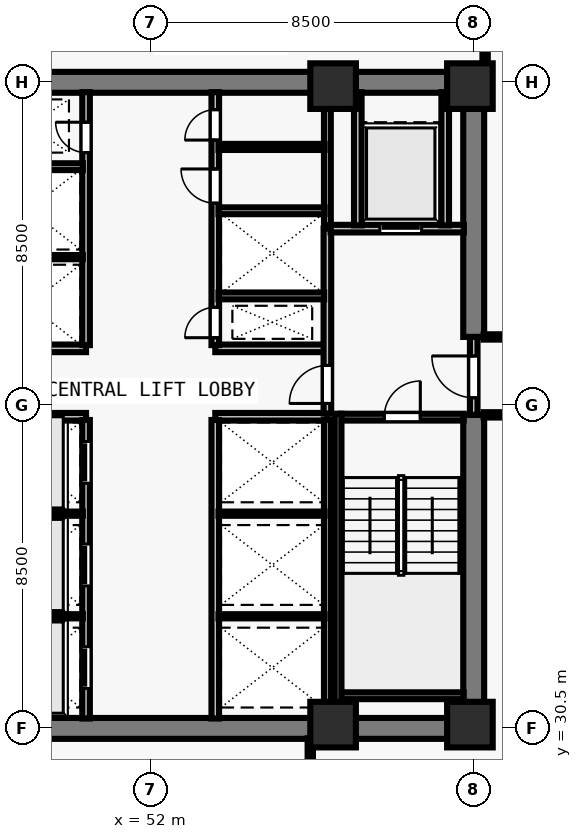
"""IFC4 building model, lengths in metres.
Left out: names, types, materials, properties, quantities, classifications, styles, units other than length and angle.
Written with IfcOpenShell. Run it as: python <this file> out.ifc"""

import sys

from ifc_helpers import new_model, si_unit, direction, frame, frame_2d, origin, origin_2d, place, context, subcontext, project, spatial, rectangle, extrude, element, fill, save


model = new_model("IFC4")
c1 = context("Model", 3, precision=1e-05, world=origin(), true_north=direction((0.0, 1.0)))
c2 = subcontext(c1, "Body", "Model", "MODEL_VIEW")
j1 = project(units=[si_unit("LENGTHUNIT", "METRE"), si_unit("PLANEANGLEUNIT", "RADIAN")], contexts=[c1])
p1 = place(None, origin())
s1 = spatial("IfcSite", under=j1, at=p1, CompositionType="ELEMENT")
p2 = place(p1, origin())
s2 = spatial("IfcBuilding", under=s1, at=p2, CompositionType="ELEMENT")
p3 = place(p2, frame((0.0, 0.0, 44.5)))
s3 = spatial("IfcBuildingStorey", under=s2, at=p3, CompositionType="ELEMENT", Elevation=44.5)
for number, where, z_axis, x_axis in (
    (1, (56.8, 30.6, 0.0), (0.0, 0.0, 1.0), (1.0, 0.0, 0.0)),
    (2, (60.4, 30.6, 0.0), (0.0, 0.0, 1.0), (1.0, 0.0, 0.0)),
    (3, (56.8, 47.4, 0.0), (0.0, 0.0, 1.0), (1.0, 0.0, 0.0)),
    (4, (60.4, 47.4, 0.0), (0.0, 0.0, 1.0), (1.0, 0.0, 0.0)),
):
    element("IfcColumn", number, at=place(p3, frame(where, z_axis=z_axis, x_axis=x_axis)), inside=s3, PredefinedType="COLUMN", context=c2, shape_type="SweptSolid", body=[
        extrude(rectangle(XDim=1.2, YDim=1.2, at=origin_2d()), origin(), (0.0, 0.0, 1.0), 3.5),
    ])
for number, where, z_axis, x_axis in (
    (5, (43.225, 30.5, 0.0), (0.0, 0.0, 1.0), (1.0, 0.0, 0.0)),
    (6, (43.225, 47.5, 0.0), (0.0, 0.0, 1.0), (1.0, 0.0, 0.0)),
):
    element("IfcWall", number, at=place(p3, frame(where, z_axis=z_axis, x_axis=x_axis)), inside=s3, PredefinedType="SHEAR", context=c2, shape_type="SweptSolid", body=[
        extrude(rectangle(XDim=17.55, YDim=0.55, at=frame_2d((8.775, 0.0))), origin(), (0.0, 0.0, 1.0), 3.28),
    ])
p4 = place(p3, frame((60.5, 30.765, 0.0), z_axis=(0.0, 0.0, 1.0), x_axis=(0.0, 1.0, 0.0)))
e7 = element("IfcWall", 7, at=p4, inside=s3, PredefinedType="SHEAR", context=c2, shape_type="SweptSolid", body=[
    extrude(rectangle(XDim=7.985, YDim=0.55, at=frame_2d((3.993, 0.0))), origin(), (0.0, 0.0, 1.0), 3.28),
])
p5 = place(p3, frame((60.5, 40.8, 0.0), z_axis=(0.0, 0.0, 1.0), x_axis=(0.0, 1.0, 0.0)))
e8 = element("IfcWall", 8, at=p5, inside=s3, PredefinedType="SHEAR", context=c2, shape_type="SweptSolid", body=[
    extrude(rectangle(XDim=6.435, YDim=0.55, at=frame_2d((3.218, 0.0))), origin(), (0.0, 0.0, 1.0), 3.28),
])
for number, where, z_axis, x_axis in (
    (9, (47.35, 38.7, 0.0), (0.0, 0.0, 1.0), (1.0, 0.0, 0.0)),
    (10, (47.35, 40.5, 0.0), (0.0, 0.0, 1.0), (1.0, 0.0, 0.0)),
    (11, (53.7, 38.7, 0.0), (0.0, 0.0, 1.0), (1.0, 0.0, 0.0)),
    (12, (53.7, 40.5, 0.0), (0.0, 0.0, 1.0), (1.0, 0.0, 0.0)),
):
    element("IfcWall", number, at=place(p3, frame(where, z_axis=z_axis, x_axis=x_axis)), inside=s3, PredefinedType="SOLIDWALL", context=c2, shape_type="SweptSolid", body=[
        extrude(rectangle(XDim=2.95, YDim=0.2, at=frame_2d((1.475, 0.0))), origin(), (0.0, 0.0, 1.0), 3.28),
    ])
p6 = place(p3, frame((50.3, 30.76, 0.0), z_axis=(0.0, 0.0, 1.0), x_axis=(0.0, 1.0, 0.0)))
e13 = element("IfcWall", 13, at=p6, inside=s3, PredefinedType="SOLIDWALL", context=c2, shape_type="SweptSolid", body=[
    extrude(rectangle(XDim=7.855, YDim=0.2, at=frame_2d((3.927, 0.0))), origin(), (0.0, 0.0, 1.0), 3.28),
])
p7 = place(p6, frame((0.79, 0.0, 0.0)))
e14 = element("IfcOpeningElement", 14, at=p7, cuts=e13, PredefinedType="OPENING", context=c2, shape_type="SweptSolid", body=[
    extrude(rectangle(XDim=1.1, YDim=2.2, at=frame_2d((0.55, 1.1))), frame((0.0, 0.11, 0.0), z_axis=(0.0, -1.0, 0.0), x_axis=(1.0, 0.0, 0.0)), (0.0, 0.0, 1.0), 0.22),
])
p8 = place(p6, frame((3.49, 0.0, 0.0)))
e15 = element("IfcOpeningElement", 15, at=p8, cuts=e13, PredefinedType="OPENING", context=c2, shape_type="SweptSolid", body=[
    extrude(rectangle(XDim=1.1, YDim=2.2, at=frame_2d((0.55, 1.1))), frame((0.0, 0.11, 0.0), z_axis=(0.0, -1.0, 0.0), x_axis=(1.0, 0.0, 0.0)), (0.0, 0.0, 1.0), 0.22),
])
p9 = place(p6, frame((6.19, 0.0, 0.0)))
e16 = element("IfcOpeningElement", 16, at=p9, cuts=e13, PredefinedType="OPENING", context=c2, shape_type="SweptSolid", body=[
    extrude(rectangle(XDim=1.1, YDim=2.2, at=frame_2d((0.55, 1.1))), frame((0.0, 0.11, 0.0), z_axis=(0.0, -1.0, 0.0), x_axis=(1.0, 0.0, 0.0)), (0.0, 0.0, 1.0), 0.22),
])
p10 = place(p3, frame((53.7, 30.76, 0.0), z_axis=(0.0, 0.0, 1.0), x_axis=(0.0, 1.0, 0.0)))
e17 = element("IfcWall", 17, at=p10, inside=s3, PredefinedType="SOLIDWALL", context=c2, shape_type="SweptSolid", body=[
    extrude(rectangle(XDim=7.855, YDim=0.2, at=frame_2d((3.927, 0.0))), origin(), (0.0, 0.0, 1.0), 3.28),
])
p11 = place(p3, frame((50.3, 40.585, 0.0), z_axis=(0.0, 0.0, 1.0), x_axis=(0.0, 1.0, 0.0)))
e18 = element("IfcWall", 18, at=p11, inside=s3, PredefinedType="SOLIDWALL", context=c2, shape_type="SweptSolid", body=[
    extrude(rectangle(XDim=6.655, YDim=0.2, at=frame_2d((3.328, 0.0))), origin(), (0.0, 0.0, 1.0), 3.28),
])
p12 = place(p11, frame((5.065, 0.0, 0.0)))
e19 = element("IfcOpeningElement", 19, at=p12, cuts=e18, PredefinedType="OPENING", context=c2, shape_type="SweptSolid", body=[
    extrude(rectangle(XDim=0.8, YDim=2.08, at=frame_2d((0.4, 1.04))), frame((0.0, 0.11, 0.0), z_axis=(0.0, -1.0, 0.0), x_axis=(1.0, 0.0, 0.0)), (0.0, 0.0, 1.0), 0.22),
])
p13 = place(p3, frame((53.7, 40.585, 0.0), z_axis=(0.0, 0.0, 1.0), x_axis=(0.0, 1.0, 0.0)))
e20 = element("IfcWall", 20, at=p13, inside=s3, PredefinedType="SOLIDWALL", context=c2, shape_type="SweptSolid", body=[
    extrude(rectangle(XDim=6.655, YDim=0.2, at=frame_2d((3.328, 0.0))), origin(), (0.0, 0.0, 1.0), 3.28),
])
p14 = place(p13, frame((0.195, 0.0, 0.0)))
e21 = element("IfcOpeningElement", 21, at=p14, cuts=e20, PredefinedType="OPENING", context=c2, shape_type="SweptSolid", body=[
    extrude(rectangle(XDim=0.8, YDim=2.08, at=frame_2d((0.4, 1.04))), frame((0.0, 0.11, 0.0), z_axis=(0.0, -1.0, 0.0), x_axis=(1.0, 0.0, 0.0)), (0.0, 0.0, 1.0), 0.22),
])
p15 = place(p13, frame((3.735, 0.0, 0.0)))
e22 = element("IfcOpeningElement", 22, at=p15, cuts=e20, PredefinedType="OPENING", context=c2, shape_type="SweptSolid", body=[
    extrude(rectangle(XDim=0.9, YDim=2.12, at=frame_2d((0.45, 1.06))), frame((0.0, 0.11, 0.0), z_axis=(0.0, -1.0, 0.0), x_axis=(1.0, 0.0, 0.0)), (0.0, 0.0, 1.0), 0.22),
])
p16 = place(p13, frame((5.395, 0.0, 0.0)))
e23 = element("IfcOpeningElement", 23, at=p16, cuts=e20, PredefinedType="OPENING", context=c2, shape_type="SweptSolid", body=[
    extrude(rectangle(XDim=0.8, YDim=2.1, at=frame_2d((0.4, 1.05))), frame((0.0, 0.11, 0.0), z_axis=(0.0, -1.0, 0.0), x_axis=(1.0, 0.0, 0.0)), (0.0, 0.0, 1.0), 0.22),
])
p17 = place(p3, frame((60.5, 38.75, 0.0), z_axis=(0.0, 0.0, 1.0), x_axis=(0.0, 1.0, 0.0)))
e24 = element("IfcWall", 24, at=p17, inside=s3, PredefinedType="SOLIDWALL", context=c2, shape_type="SweptSolid", body=[
    extrude(rectangle(XDim=2.05, YDim=0.2, at=frame_2d((1.025, 0.0))), origin(), (0.0, 0.0, 1.0), 3.28),
])
p18 = place(p17, frame((0.45, 0.0, 0.0)))
e25 = element("IfcOpeningElement", 25, at=p18, cuts=e24, PredefinedType="OPENING", context=c2, shape_type="SweptSolid", body=[
    extrude(rectangle(XDim=1.1, YDim=2.15, at=frame_2d((0.55, 1.075))), frame((0.0, 0.11, 0.0), z_axis=(0.0, -1.0, 0.0), x_axis=(1.0, 0.0, 0.0)), (0.0, 0.0, 1.0), 0.22),
])
p19 = place(p3, frame((56.65, 38.785, 0.0), z_axis=(0.0, 0.0, 1.0), x_axis=(0.0, 1.0, 0.0)))
e26 = element("IfcWall", 26, at=p19, inside=s3, PredefinedType="SOLIDWALL", context=c2, shape_type="SweptSolid", body=[
    extrude(rectangle(XDim=4.865, YDim=0.2, at=frame_2d((2.433, 0.0))), origin(), (0.0, 0.0, 1.0), 3.28),
])
p20 = place(p19, frame((0.265, 0.0, 0.0)))
e27 = element("IfcOpeningElement", 27, at=p20, cuts=e26, PredefinedType="OPENING", context=c2, shape_type="SweptSolid", body=[
    extrude(rectangle(XDim=1.0, YDim=2.15, at=frame_2d((0.5, 1.075))), frame((0.0, 0.11, 0.0), z_axis=(0.0, -1.0, 0.0), x_axis=(1.0, 0.0, 0.0)), (0.0, 0.0, 1.0), 0.22),
])
p21 = place(p3, frame((56.735, 43.65, 0.0), z_axis=(0.0, 0.0, 1.0), x_axis=(1.0, 0.0, 0.0)))
e28 = element("IfcWall", 28, at=p21, inside=s3, PredefinedType="SOLIDWALL", context=c2, shape_type="SweptSolid", body=[
    extrude(rectangle(XDim=3.505, YDim=0.2, at=frame_2d((1.752, 0.0))), origin(), (0.0, 0.0, 1.0), 3.28),
])
p22 = place(p21, frame((1.295, 0.0, 0.0)))
e29 = element("IfcOpeningElement", 29, at=p22, cuts=e28, PredefinedType="OPENING", context=c2, shape_type="SweptSolid", body=[
    extrude(rectangle(XDim=1.1, YDim=2.2, at=frame_2d((0.55, 1.1))), frame((0.0, 0.11, 0.0), z_axis=(0.0, -1.0, 0.0), x_axis=(1.0, 0.0, 0.0)), (0.0, 0.0, 1.0), 0.22),
])
for number, where, z_axis, x_axis in (
    (30, (57.45, 43.735, 0.0), (0.0, 0.0, 1.0), (0.0, 1.0, 0.0)),
    (31, (59.75, 43.735, 0.0), (0.0, 0.0, 1.0), (0.0, 1.0, 0.0)),
):
    element("IfcWall", number, at=place(p3, frame(where, z_axis=z_axis, x_axis=x_axis)), inside=s3, PredefinedType="SOLIDWALL", context=c2, shape_type="SweptSolid", body=[
        extrude(rectangle(XDim=3.505, YDim=0.2, at=frame_2d((1.752, 0.0))), origin(), (0.0, 0.0, 1.0), 3.28),
    ])
for number, where, z_axis, x_axis in (
    (32, (47.425, 33.45, 0.0), (0.0, 0.0, 1.0), (1.0, 0.0, 0.0)),
    (33, (47.425, 36.15, 0.0), (0.0, 0.0, 1.0), (1.0, 0.0, 0.0)),
):
    element("IfcWall", number, at=place(p3, frame(where, z_axis=z_axis, x_axis=x_axis)), inside=s3, PredefinedType="PARTITIONING", context=c2, shape_type="SweptSolid", body=[
        extrude(rectangle(XDim=2.79, YDim=0.11, at=frame_2d((1.395, 0.0))), origin(), (0.0, 0.0, 1.0), 3.28),
    ])
p23 = place(p3, frame((56.65, 30.76, 0.0), z_axis=(0.0, 0.0, 1.0), x_axis=(0.0, 1.0, 0.0)))
e34 = element("IfcWall", 34, at=p23, inside=s3, PredefinedType="SOLIDWALL", context=c2, shape_type="SweptSolid", body=[
    extrude(rectangle(XDim=7.855, YDim=0.18, at=frame_2d((3.927, 0.0))), origin(), (0.0, 0.0, 1.0), 3.28),
])
for number, where, z_axis, x_axis in (
    (35, (53.785, 33.45, 0.0), (0.0, 0.0, 1.0), (1.0, 0.0, 0.0)),
    (36, (53.785, 36.15, 0.0), (0.0, 0.0, 1.0), (1.0, 0.0, 0.0)),
):
    element("IfcWall", number, at=place(p3, frame(where, z_axis=z_axis, x_axis=x_axis)), inside=s3, PredefinedType="PARTITIONING", context=c2, shape_type="SweptSolid", body=[
        extrude(rectangle(XDim=2.79, YDim=0.11, at=frame_2d((1.395, 0.0))), origin(), (0.0, 0.0, 1.0), 3.28),
    ])
p24 = place(p3, frame((47.435, 42.9, 0.0), z_axis=(0.0, 0.0, 1.0), x_axis=(1.0, 0.0, 0.0)))
e37 = element("IfcWall", 37, at=p24, inside=s3, PredefinedType="PARTITIONING", context=c2, shape_type="SweptSolid", body=[
    extrude(rectangle(XDim=2.78, YDim=0.11, at=frame_2d((1.39, 0.0))), origin(), (0.0, 0.0, 1.0), 3.28),
])
p25 = place(p3, frame((47.425, 45.28, 0.0), z_axis=(0.0, 0.0, 1.0), x_axis=(1.0, 0.0, 0.0)))
e38 = element("IfcWall", 38, at=p25, inside=s3, PredefinedType="SOLIDWALL", context=c2, shape_type="SweptSolid", body=[
    extrude(rectangle(XDim=2.79, YDim=0.18, at=frame_2d((1.395, 0.0))), origin(), (0.0, 0.0, 1.0), 3.28),
])
p26 = place(p3, frame((56.65, 43.735, 0.0), z_axis=(0.0, 0.0, 1.0), x_axis=(0.0, 1.0, 0.0)))
e39 = element("IfcWall", 39, at=p26, inside=s3, PredefinedType="SOLIDWALL", context=c2, shape_type="SweptSolid", body=[
    extrude(rectangle(XDim=3.505, YDim=0.18, at=frame_2d((1.752, 0.0))), origin(), (0.0, 0.0, 1.0), 3.28),
])
p27 = place(p3, frame((53.785, 41.88, 0.0), z_axis=(0.0, 0.0, 1.0), x_axis=(1.0, 0.0, 0.0)))
e40 = element("IfcWall", 40, at=p27, inside=s3, PredefinedType="SOLIDWALL", context=c2, shape_type="SweptSolid", body=[
    extrude(rectangle(XDim=2.78, YDim=0.18, at=frame_2d((1.39, 0.0))), origin(), (0.0, 0.0, 1.0), 3.28),
])
p28 = place(p3, frame((53.785, 44.12, 0.0), z_axis=(0.0, 0.0, 1.0), x_axis=(1.0, 0.0, 0.0)))
e41 = element("IfcWall", 41, at=p28, inside=s3, PredefinedType="SOLIDWALL", context=c2, shape_type="SweptSolid", body=[
    extrude(rectangle(XDim=2.79, YDim=0.18, at=frame_2d((1.395, 0.0))), origin(), (0.0, 0.0, 1.0), 3.28),
])
p29 = place(p3, frame((53.785, 45.8, 0.0), z_axis=(0.0, 0.0, 1.0), x_axis=(1.0, 0.0, 0.0)))
e42 = element("IfcWall", 42, at=p29, inside=s3, PredefinedType="PARTITIONING", context=c2, shape_type="SweptSolid", body=[
    extrude(rectangle(XDim=2.79, YDim=0.16, at=frame_2d((1.395, 0.0))), origin(), (0.0, 0.0, 1.0), 3.28),
])
for number, where, z_axis, x_axis in (
    (43, (60.76, 38.75, 0.0), (0.0, 0.0, 1.0), (1.0, 0.0, 0.0)),
    (44, (60.76, 40.8, 0.0), (0.0, 0.0, 1.0), (1.0, 0.0, 0.0)),
):
    element("IfcWall", number, at=place(p3, frame(where, z_axis=z_axis, x_axis=x_axis)), inside=s3, PredefinedType="PARTITIONING", context=c2, shape_type="SweptSolid", body=[
        extrude(rectangle(XDim=4.385, YDim=0.14, at=frame_2d((2.192, 0.0))), origin(), (0.0, 0.0, 1.0), 3.28),
    ])
p30 = place(p3, frame((56.2, 25.555, 0.0), z_axis=(0.0, 0.0, 1.0), x_axis=(0.0, 1.0, 0.0)))
e45 = element("IfcWall", 45, at=p30, inside=s3, PredefinedType="PARTITIONING", context=c2, shape_type="SweptSolid", body=[
    extrude(rectangle(XDim=4.685, YDim=0.14, at=frame_2d((2.343, 0.0))), origin(), (0.0, 0.0, 1.0), 2.849),
])
p31 = place(p3, frame((60.8, 47.76, 0.0), z_axis=(0.0, 0.0, 1.0), x_axis=(0.0, 1.0, 0.0)))
e46 = element("IfcWall", 46, at=p31, inside=s3, PredefinedType="PARTITIONING", context=c2, shape_type="SweptSolid", body=[
    extrude(rectangle(XDim=4.685, YDim=0.14, at=frame_2d((2.343, 0.0))), origin(), (0.0, 0.0, 1.0), 2.439),
])
p32 = place(p3, frame((57.005, 38.69, 0.0), z_axis=(0.0, 0.0, 1.0), x_axis=(1.0, 0.0, 0.0)))
e47 = element("IfcWall", 47, at=p32, inside=s3, PredefinedType="SOLIDWALL", context=c2, shape_type="SweptSolid", body=[
    extrude(rectangle(XDim=3.23, YDim=0.18, at=frame_2d((1.615, 0.0))), origin(), (0.0, 0.0, 1.0), 3.28),
])
p33 = place(p32, frame((1.14, 0.0, 0.0)))
e48 = element("IfcOpeningElement", 48, at=p33, cuts=e47, PredefinedType="OPENING", context=c2, shape_type="SweptSolid", body=[
    extrude(rectangle(XDim=0.95, YDim=2.15, at=frame_2d((0.475, 1.075))), frame((0.0, 0.1, 0.0), z_axis=(0.0, -1.0, 0.0), x_axis=(1.0, 0.0, 0.0)), (0.0, 0.0, 1.0), 0.2),
])
p34 = place(p3, frame((57.005, 31.36, 0.0), z_axis=(0.0, 0.0, 1.0), x_axis=(1.0, 0.0, 0.0)))
e49 = element("IfcWall", 49, at=p34, inside=s3, PredefinedType="SOLIDWALL", context=c2, shape_type="SweptSolid", body=[
    extrude(rectangle(XDim=3.23, YDim=0.18, at=frame_2d((1.615, 0.0))), origin(), (0.0, 0.0, 1.0), 3.28),
])
p35 = place(p3, frame((56.93, 38.78, 0.0), z_axis=(0.0, 0.0, 1.0), x_axis=(0.0, -1.0, 0.0)))
e50 = element("IfcWall", 50, at=p35, inside=s3, PredefinedType="SOLIDWALL", context=c2, shape_type="SweptSolid", body=[
    extrude(rectangle(XDim=8.017, YDim=0.18, at=frame_2d((4.009, 0.0))), origin(), (0.0, 0.0, 1.0), 3.28),
])
p36 = place(p18, origin())
e51 = element("IfcDoor", 51, at=p36, inside=s3, OperationType="SINGLE_SWING_RIGHT", PredefinedType="DOOR", context=c2, shape_type="SweptSolid", body=[
    extrude(rectangle(XDim=1.1, YDim=2.15, at=frame_2d((0.55, 1.075))), frame((0.0, 0.025, 0.0), z_axis=(0.0, -1.0, 0.0), x_axis=(1.0, 0.0, 0.0)), (0.0, 0.0, 1.0), 0.05),
])
fill(e25, e51)
p37 = place(p20, origin())
e52 = element("IfcDoor", 52, at=p37, inside=s3, OperationType="SINGLE_SWING_LEFT", PredefinedType="DOOR", context=c2, shape_type="SweptSolid", body=[
    extrude(rectangle(XDim=1.0, YDim=2.15, at=frame_2d((0.5, 1.075))), frame((0.0, 0.025, 0.0), z_axis=(0.0, -1.0, 0.0), x_axis=(1.0, 0.0, 0.0)), (0.0, 0.0, 1.0), 0.05),
])
fill(e27, e52)
p38 = place(p22, origin())
e53 = element("IfcDoor", 53, at=p38, inside=s3, OperationType="SLIDING_TO_LEFT", PredefinedType="DOOR", context=c2, shape_type="SweptSolid", body=[
    extrude(rectangle(XDim=1.1, YDim=2.2, at=frame_2d((0.55, 1.1))), frame((0.0, 0.025, 0.0), z_axis=(0.0, -1.0, 0.0), x_axis=(1.0, 0.0, 0.0)), (0.0, 0.0, 1.0), 0.05),
])
fill(e29, e53)
p39 = place(p7, origin())
e54 = element("IfcDoor", 54, at=p39, inside=s3, OperationType="SLIDING_TO_LEFT", PredefinedType="DOOR", context=c2, shape_type="SweptSolid", body=[
    extrude(rectangle(XDim=1.1, YDim=2.2, at=frame_2d((0.55, 1.1))), frame((0.0, 0.025, 0.0), z_axis=(0.0, -1.0, 0.0), x_axis=(1.0, 0.0, 0.0)), (0.0, 0.0, 1.0), 0.05),
])
fill(e14, e54)
p40 = place(p8, origin())
e55 = element("IfcDoor", 55, at=p40, inside=s3, OperationType="SLIDING_TO_LEFT", PredefinedType="DOOR", context=c2, shape_type="SweptSolid", body=[
    extrude(rectangle(XDim=1.1, YDim=2.2, at=frame_2d((0.55, 1.1))), frame((0.0, 0.025, 0.0), z_axis=(0.0, -1.0, 0.0), x_axis=(1.0, 0.0, 0.0)), (0.0, 0.0, 1.0), 0.05),
])
fill(e15, e55)
p41 = place(p9, origin())
e56 = element("IfcDoor", 56, at=p41, inside=s3, OperationType="SLIDING_TO_LEFT", PredefinedType="DOOR", context=c2, shape_type="SweptSolid", body=[
    extrude(rectangle(XDim=1.1, YDim=2.2, at=frame_2d((0.55, 1.1))), frame((0.0, 0.025, 0.0), z_axis=(0.0, -1.0, 0.0), x_axis=(1.0, 0.0, 0.0)), (0.0, 0.0, 1.0), 0.05),
])
fill(e16, e56)
p42 = place(p12, origin())
e57 = element("IfcDoor", 57, at=p42, inside=s3, OperationType="SINGLE_SWING_RIGHT", PredefinedType="DOOR", context=c2, shape_type="SweptSolid", body=[
    extrude(rectangle(XDim=0.8, YDim=2.08, at=frame_2d((0.4, 1.04))), frame((0.0, 0.025, 0.0), z_axis=(0.0, -1.0, 0.0), x_axis=(1.0, 0.0, 0.0)), (0.0, 0.0, 1.0), 0.05),
])
fill(e19, e57)
p43 = place(p14, origin())
e58 = element("IfcDoor", 58, at=p43, inside=s3, OperationType="SINGLE_SWING_LEFT", PredefinedType="DOOR", context=c2, shape_type="SweptSolid", body=[
    extrude(rectangle(XDim=0.8, YDim=2.08, at=frame_2d((0.4, 1.04))), frame((0.0, 0.025, 0.0), z_axis=(0.0, -1.0, 0.0), x_axis=(1.0, 0.0, 0.0)), (0.0, 0.0, 1.0), 0.05),
])
fill(e21, e58)
p44 = place(p15, origin())
e59 = element("IfcDoor", 59, at=p44, inside=s3, OperationType="SINGLE_SWING_RIGHT", PredefinedType="DOOR", context=c2, shape_type="SweptSolid", body=[
    extrude(rectangle(XDim=0.9, YDim=2.12, at=frame_2d((0.45, 1.06))), frame((0.0, 0.025, 0.0), z_axis=(0.0, -1.0, 0.0), x_axis=(1.0, 0.0, 0.0)), (0.0, 0.0, 1.0), 0.05),
])
fill(e22, e59)
p45 = place(p16, origin())
e60 = element("IfcDoor", 60, at=p45, inside=s3, OperationType="SINGLE_SWING_LEFT", PredefinedType="DOOR", context=c2, shape_type="SweptSolid", body=[
    extrude(rectangle(XDim=0.8, YDim=2.1, at=frame_2d((0.4, 1.05))), frame((0.0, 0.025, 0.0), z_axis=(0.0, -1.0, 0.0), x_axis=(1.0, 0.0, 0.0)), (0.0, 0.0, 1.0), 0.05),
])
fill(e23, e60)
p46 = place(p33, origin())
e61 = element("IfcDoor", 61, at=p46, inside=s3, OperationType="SINGLE_SWING_RIGHT", PredefinedType="DOOR", context=c2, shape_type="SweptSolid", body=[
    extrude(rectangle(XDim=0.95, YDim=2.15, at=frame_2d((0.475, 1.075))), frame((0.0, 0.025, 0.0), z_axis=(0.0, -1.0, 0.0), x_axis=(1.0, 0.0, 0.0)), (0.0, 0.0, 1.0), 0.05),
])
fill(e48, e61)
save(model, sys.argv[1])
